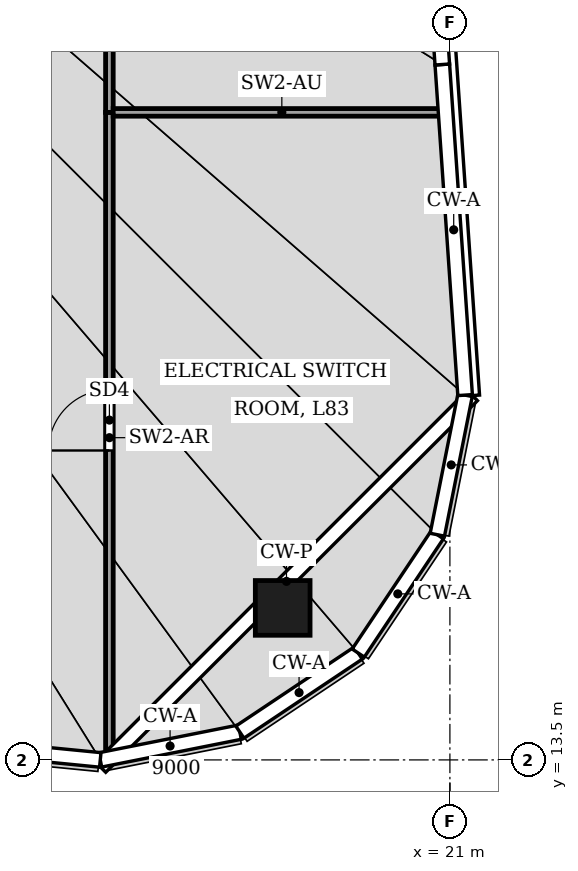
"""IFC4 building model, lengths in metres.
Left out: names, types, materials, properties, quantities, classifications, styles, units other than length and angle.
Written with IfcOpenShell. Run it as: python <this file> out.ifc"""

import sys

from ifc_helpers import new_model, si_unit, direction, frame, frame_2d, origin, origin_2d, place, context, subcontext, project, spatial, rectangle, hollow_rectangle, extrude, element, fill, save


model = new_model("IFC4")
c1 = context("Model", 3, precision=1e-05, world=origin(), true_north=direction((0.0, 1.0)))
c2 = subcontext(c1, "Body", "Model", "MODEL_VIEW")
j1 = project(units=[si_unit("LENGTHUNIT", "METRE"), si_unit("PLANEANGLEUNIT", "RADIAN")], contexts=[c1])
p1 = place(None, origin())
s1 = spatial("IfcSite", under=j1, at=p1, CompositionType="ELEMENT")
p2 = place(p1, origin())
s2 = spatial("IfcBuilding", under=s1, at=p2, CompositionType="ELEMENT")
p3 = place(p2, frame((0.0, 0.0, 368.0)))
s3 = spatial("IfcBuildingStorey", under=s2, at=p3, CompositionType="ELEMENT", Elevation=368.0)
p4 = place(p3, frame((18.25, 16.0, 0.0), z_axis=(0.0, 0.0, 1.0), x_axis=(1.0, 0.0, 0.0)))
e1 = element("IfcColumn", 1, at=p4, inside=s3, PredefinedType="COLUMN", context=c2, shape_type="SweptSolid", body=[
    extrude(hollow_rectangle(XDim=0.9, YDim=0.9, WallThickness=0.04, at=origin_2d()), origin(), (0.0, 0.0, 1.0), 3.3),
])
p5 = place(p3, frame((15.4, 13.45, 0.0), z_axis=(0.0, 0.0, 1.0), x_axis=(0.0, 1.0, 0.0)))
e2 = element("IfcWall", 2, at=p5, inside=s3, PredefinedType="PARTITIONING", context=c2, shape_type="SweptSolid", body=[
    extrude(rectangle(XDim=10.7, YDim=0.125, at=frame_2d((5.35, 0.0))), origin(), (0.0, 0.0, 1.0), 2.262),
])
p6 = place(p5, frame((5.139, 0.0, 0.0)))
e3 = element("IfcOpeningElement", 3, at=p6, cuts=e2, PredefinedType="OPENING", context=c2, shape_type="SweptSolid", body=[
    extrude(rectangle(XDim=1.0, YDim=2.1, at=frame_2d((0.5, 1.05))), frame((0.0, 0.073, 0.0), z_axis=(0.0, -1.0, 0.0), x_axis=(1.0, 0.0, 0.0)), (0.0, 0.0, 1.0), 0.145),
])
p7 = place(p3, frame((15.4, 24.15, 0.0), z_axis=(0.0, 0.0, 1.0), x_axis=(0.0, 1.0, 0.0)))
e4 = element("IfcWall", 4, at=p7, inside=s3, PredefinedType="PARTITIONING", context=c2, shape_type="SweptSolid", body=[
    extrude(rectangle(XDim=10.15, YDim=0.125, at=frame_2d((5.075, 0.0))), origin(), (0.0, 0.0, 1.0), 2.97),
])
p8 = place(p7, frame((6.5, 0.0, 0.0)))
e5 = element("IfcOpeningElement", 5, at=p8, cuts=e4, PredefinedType="OPENING", context=c2, shape_type="SweptSolid", body=[
    extrude(rectangle(XDim=1.8, YDim=2.4, at=frame_2d((0.9, 1.2))), frame((0.0, 0.073, 0.0), z_axis=(0.0, -1.0, 0.0), x_axis=(1.0, 0.0, 0.0)), (0.0, 0.0, 1.0), 0.145),
])
p9 = place(p3, frame((15.462, 24.15, 0.0), z_axis=(0.0, 0.0, 1.0), x_axis=(1.0, 0.0, 0.0)))
e6 = element("IfcWall", 6, at=p9, inside=s3, PredefinedType="PARTITIONING", context=c2, shape_type="SweptSolid", body=[
    extrude(rectangle(XDim=5.547, YDim=0.125, at=frame_2d((2.773, 0.0))), origin(), (0.0, 0.0, 1.0), 2.47),
])
p10 = place(p6, origin())
e7 = element("IfcDoor", 7, at=p10, inside=s3, OperationType="SINGLE_SWING_RIGHT", PredefinedType="DOOR", context=c2, shape_type="SweptSolid", body=[
    extrude(rectangle(XDim=1.0, YDim=2.1, at=frame_2d((0.5, 1.05))), frame((0.0, 0.025, 0.0), z_axis=(0.0, -1.0, 0.0), x_axis=(1.0, 0.0, 0.0)), (0.0, 0.0, 1.0), 0.05),
])
fill(e3, e7)
save(model, sys.argv[1])
